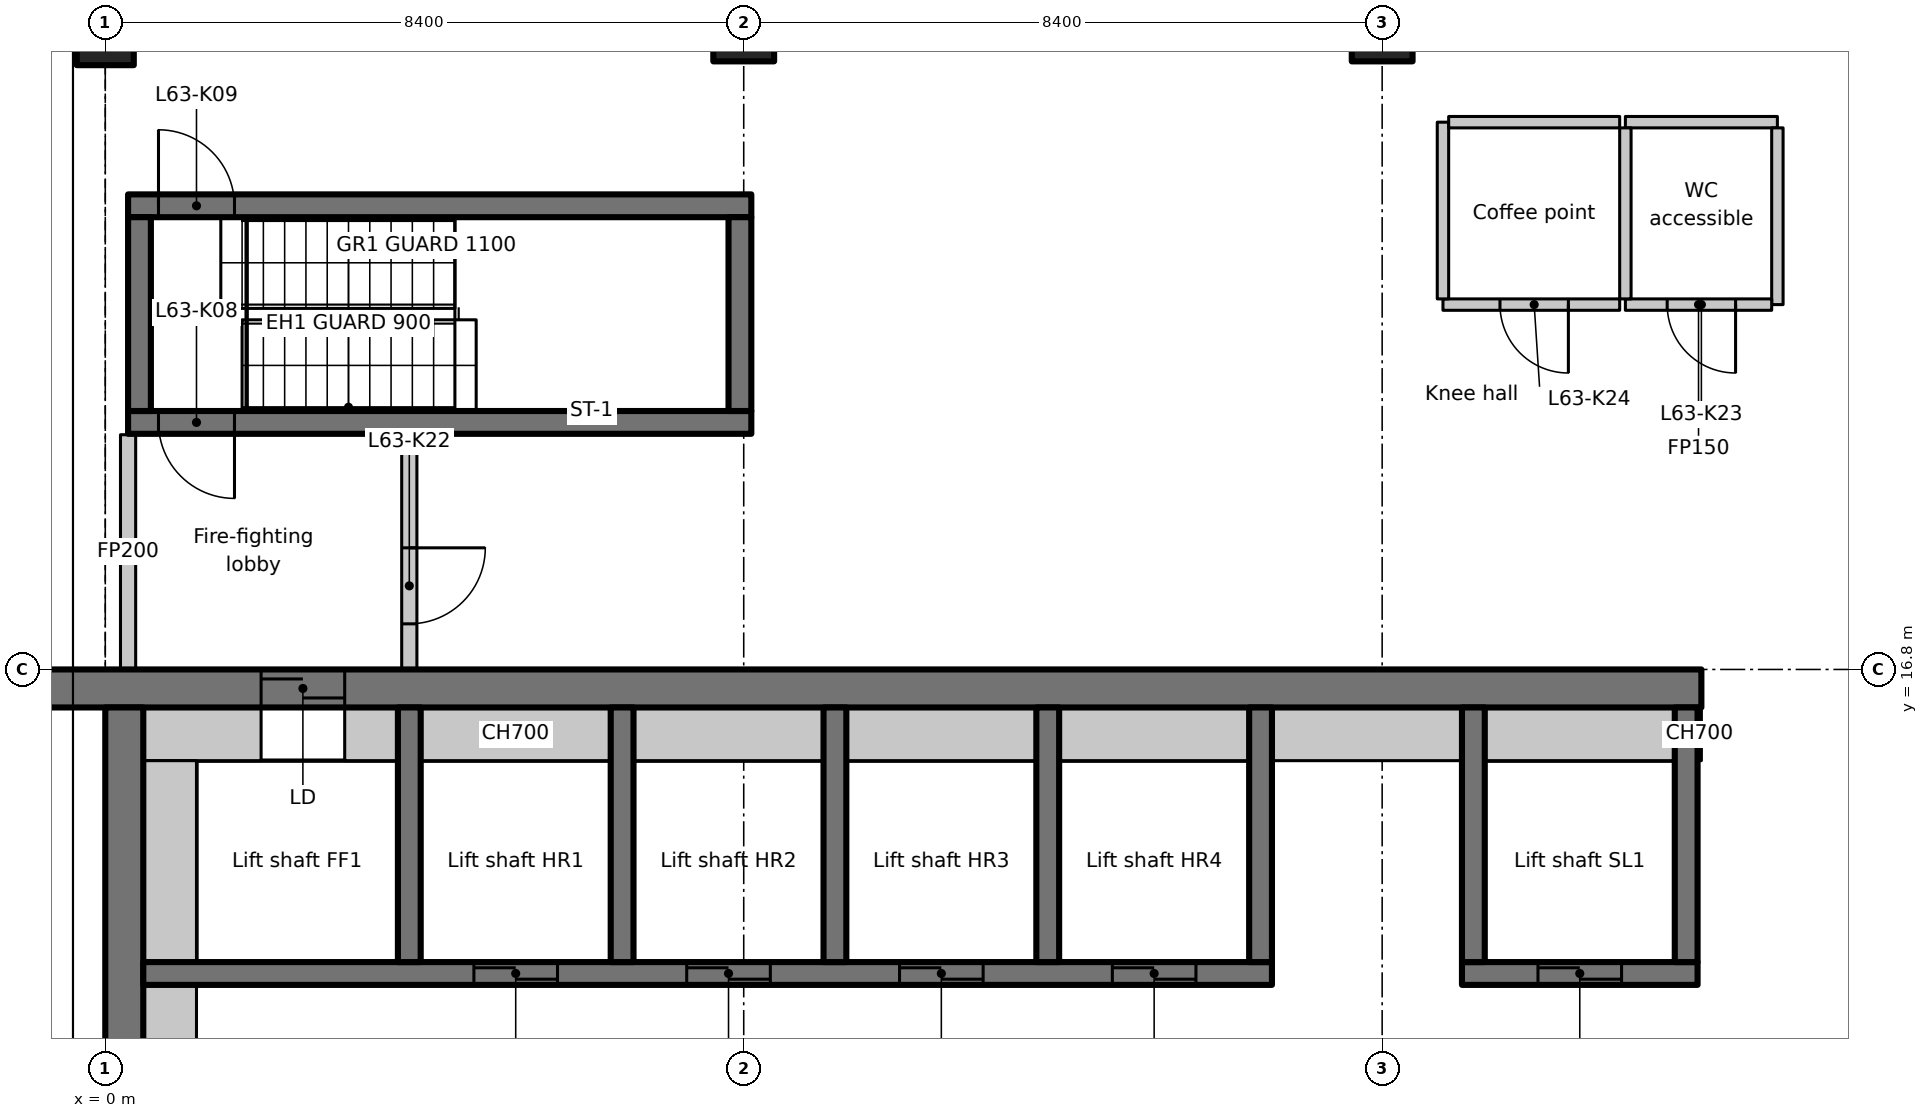
"""IFC4 building model, lengths in metres.
Left out: names, types, materials, properties, quantities, classifications, styles, units other than length and angle.
Written with IfcOpenShell. Run it as: python <this file> out.ifc"""

import sys

from ifc_helpers import new_model, si_unit, direction, frame, frame_2d, origin, origin_2d, place, context, subcontext, project, spatial, rectangle, extrude, element, fill, save


model = new_model("IFC4")
c1 = context("Model", 3, precision=1e-05, world=origin(), true_north=direction((0.0, 1.0)))
c2 = subcontext(c1, "Body", "Model", "MODEL_VIEW")
j1 = project(units=[si_unit("LENGTHUNIT", "METRE"), si_unit("PLANEANGLEUNIT", "RADIAN")], contexts=[c1])
p1 = place(None, origin())
s1 = spatial("IfcSite", under=j1, at=p1, CompositionType="ELEMENT")
p2 = place(p1, origin())
s2 = spatial("IfcBuilding", under=s1, at=p2, CompositionType="ELEMENT")
p3 = place(p2, frame((0.0, 0.0, 248.1)))
s3 = spatial("IfcBuildingStorey", under=s2, at=p3, CompositionType="ELEMENT", Elevation=248.1)
p4 = place(p3, frame((0.0, 25.2, 0.0), z_axis=(0.0, 0.0, 1.0), x_axis=(1.0, 0.0, 0.0)))
e1 = element("IfcColumn", 1, at=p4, inside=s3, PredefinedType="COLUMN", context=c2, shape_type="SweptSolid", body=[
    extrude(rectangle(XDim=0.75, YDim=0.9, at=origin_2d()), origin(), (0.0, 0.0, 1.0), 3.35),
])
for number, where, z_axis, x_axis in (
    (2, (8.4, 25.2, 0.0), (0.0, 0.0, 1.0), (1.0, 0.0, 0.0)),
    (3, (16.8, 25.2, 0.0), (0.0, 0.0, 1.0), (1.0, 0.0, 0.0)),
):
    element("IfcColumn", number, at=place(p3, frame(where, z_axis=z_axis, x_axis=x_axis)), inside=s3, PredefinedType="COLUMN", context=c2, shape_type="SweptSolid", body=[
        extrude(rectangle(XDim=0.8, YDim=0.8, at=origin_2d()), origin(), (0.0, 0.0, 1.0), 3.35),
    ])
p5 = place(p3, frame((-1.1, 16.55, 0.0), z_axis=(0.0, 0.0, 1.0), x_axis=(1.0, 0.0, 0.0)))
e4 = element("IfcWall", 4, at=p5, inside=s3, PredefinedType="SHEAR", context=c2, shape_type="SweptSolid", body=[
    extrude(rectangle(XDim=22.1, YDim=0.5, at=frame_2d((11.05, 0.0))), origin(), (0.0, 0.0, 1.0), 3.35),
])
p6 = place(p5, frame((3.15, 0.0, 0.0)))
e5 = element("IfcOpeningElement", 5, at=p6, cuts=e4, PredefinedType="OPENING", context=c2, shape_type="SweptSolid", body=[
    extrude(rectangle(XDim=1.1, YDim=2.3, at=frame_2d((0.55, 1.15))), frame((0.0, 0.26, 0.0), z_axis=(0.0, -1.0, 0.0), x_axis=(1.0, 0.0, 0.0)), (0.0, 0.0, 1.0), 0.52),
])
p7 = place(p3, frame((0.25, 7.436, 0.0), z_axis=(0.0, 0.0, 1.0), x_axis=(0.0, 1.0, 0.0)))
e6 = element("IfcWall", 6, at=p7, inside=s3, PredefinedType="SHEAR", context=c2, shape_type="SweptSolid", body=[
    extrude(rectangle(XDim=8.864, YDim=0.5, at=frame_2d((4.432, 0.0))), origin(), (0.0, 0.0, 1.0), 3.35),
])
p8 = place(p3, frame((0.5, 15.95, 0.0), z_axis=(0.0, 0.0, 1.0), x_axis=(1.0, 0.0, 0.0)))
e7 = element("IfcWall", 7, at=p8, inside=s3, PredefinedType="PARTITIONING", context=c2, shape_type="SweptSolid", body=[
    extrude(rectangle(XDim=1.55, YDim=0.7, at=frame_2d((0.775, 0.0))), origin(), (0.0, 0.0, 1.0), 3.35),
])
p9 = place(p3, frame((0.5, 12.8, 0.0), z_axis=(0.0, 0.0, 1.0), x_axis=(1.0, 0.0, 0.0)))
e8 = element("IfcWall", 8, at=p9, inside=s3, PredefinedType="SHEAR", context=c2, shape_type="SweptSolid", body=[
    extrude(rectangle(XDim=14.85, YDim=0.3, at=frame_2d((7.425, 0.0))), origin(), (0.0, 0.0, 1.0), 3.35),
])
p10 = place(p9, frame((4.35, 0.0, 0.0)))
e9 = element("IfcOpeningElement", 9, at=p10, cuts=e8, PredefinedType="OPENING", context=c2, shape_type="SweptSolid", body=[
    extrude(rectangle(XDim=1.1, YDim=2.3, at=frame_2d((0.55, 1.15))), frame((0.0, 0.16, 0.0), z_axis=(0.0, -1.0, 0.0), x_axis=(1.0, 0.0, 0.0)), (0.0, 0.0, 1.0), 0.32),
])
p11 = place(p9, frame((7.15, 0.0, 0.0)))
e10 = element("IfcOpeningElement", 10, at=p11, cuts=e8, PredefinedType="OPENING", context=c2, shape_type="SweptSolid", body=[
    extrude(rectangle(XDim=1.1, YDim=2.3, at=frame_2d((0.55, 1.15))), frame((0.0, 0.16, 0.0), z_axis=(0.0, -1.0, 0.0), x_axis=(1.0, 0.0, 0.0)), (0.0, 0.0, 1.0), 0.32),
])
p12 = place(p9, frame((9.95, 0.0, 0.0)))
e11 = element("IfcOpeningElement", 11, at=p12, cuts=e8, PredefinedType="OPENING", context=c2, shape_type="SweptSolid", body=[
    extrude(rectangle(XDim=1.1, YDim=2.3, at=frame_2d((0.55, 1.15))), frame((0.0, 0.16, 0.0), z_axis=(0.0, -1.0, 0.0), x_axis=(1.0, 0.0, 0.0)), (0.0, 0.0, 1.0), 0.32),
])
p13 = place(p9, frame((12.75, 0.0, 0.0)))
e12 = element("IfcOpeningElement", 12, at=p13, cuts=e8, PredefinedType="OPENING", context=c2, shape_type="SweptSolid", body=[
    extrude(rectangle(XDim=1.1, YDim=2.3, at=frame_2d((0.55, 1.15))), frame((0.0, 0.16, 0.0), z_axis=(0.0, -1.0, 0.0), x_axis=(1.0, 0.0, 0.0)), (0.0, 0.0, 1.0), 0.32),
])
for number, where, z_axis, x_axis in (
    (13, (4.0, 12.95, 0.0), (0.0, 0.0, 1.0), (0.0, 1.0, 0.0)),
    (14, (6.8, 12.95, 0.0), (0.0, 0.0, 1.0), (0.0, 1.0, 0.0)),
    (15, (9.6, 12.95, 0.0), (0.0, 0.0, 1.0), (0.0, 1.0, 0.0)),
    (16, (12.4, 12.95, 0.0), (0.0, 0.0, 1.0), (0.0, 1.0, 0.0)),
    (17, (15.2, 12.95, 0.0), (0.0, 0.0, 1.0), (0.0, 1.0, 0.0)),
):
    element("IfcWall", number, at=place(p3, frame(where, z_axis=z_axis, x_axis=x_axis)), inside=s3, PredefinedType="SHEAR", context=c2, shape_type="SweptSolid", body=[
        extrude(rectangle(XDim=3.35, YDim=0.3, at=frame_2d((1.675, 0.0))), origin(), (0.0, 0.0, 1.0), 3.35),
    ])
p14 = place(p3, frame((17.85, 12.8, 0.0), z_axis=(0.0, 0.0, 1.0), x_axis=(1.0, 0.0, 0.0)))
e18 = element("IfcWall", 18, at=p14, inside=s3, PredefinedType="SHEAR", context=c2, shape_type="SweptSolid", body=[
    extrude(rectangle(XDim=3.1, YDim=0.3, at=frame_2d((1.55, 0.0))), origin(), (0.0, 0.0, 1.0), 3.35),
])
p15 = place(p14, frame((1.0, 0.0, 0.0)))
e19 = element("IfcOpeningElement", 19, at=p15, cuts=e18, PredefinedType="OPENING", context=c2, shape_type="SweptSolid", body=[
    extrude(rectangle(XDim=1.1, YDim=2.3, at=frame_2d((0.55, 1.15))), frame((0.0, 0.16, 0.0), z_axis=(0.0, -1.0, 0.0), x_axis=(1.0, 0.0, 0.0)), (0.0, 0.0, 1.0), 0.32),
])
for number, where, z_axis, x_axis in (
    (20, (18.0, 12.95, 0.0), (0.0, 0.0, 1.0), (0.0, 1.0, 0.0)),
    (21, (20.8, 12.95, 0.0), (0.0, 0.0, 1.0), (0.0, 1.0, 0.0)),
):
    element("IfcWall", number, at=place(p3, frame(where, z_axis=z_axis, x_axis=x_axis)), inside=s3, PredefinedType="SHEAR", context=c2, shape_type="SweptSolid", body=[
        extrude(rectangle(XDim=3.35, YDim=0.3, at=frame_2d((1.675, 0.0))), origin(), (0.0, 0.0, 1.0), 3.35),
    ])
p16 = place(p3, frame((8.5, 20.05, 0.0), z_axis=(0.0, 0.0, 1.0), x_axis=(-1.0, 0.0, 0.0)))
e22 = element("IfcWall", 22, at=p16, inside=s3, PredefinedType="SHEAR", context=c2, shape_type="SweptSolid", body=[
    extrude(rectangle(XDim=8.2, YDim=0.3, at=frame_2d((4.1, 0.0))), origin(), (0.0, 0.0, 1.0), 3.35),
])
p17 = place(p16, frame((6.8, 0.0, 0.0)))
e23 = element("IfcOpeningElement", 23, at=p17, cuts=e22, PredefinedType="OPENING", context=c2, shape_type="SweptSolid", body=[
    extrude(rectangle(XDim=1.0, YDim=2.1, at=frame_2d((0.5, 1.05))), frame((0.0, 0.16, 0.0), z_axis=(0.0, -1.0, 0.0), x_axis=(1.0, 0.0, 0.0)), (0.0, 0.0, 1.0), 0.32),
])
p18 = place(p3, frame((0.3, 22.9, 0.0), z_axis=(0.0, 0.0, 1.0), x_axis=(1.0, 0.0, 0.0)))
e24 = element("IfcWall", 24, at=p18, inside=s3, PredefinedType="SHEAR", context=c2, shape_type="SweptSolid", body=[
    extrude(rectangle(XDim=8.2, YDim=0.3, at=frame_2d((4.1, 0.0))), origin(), (0.0, 0.0, 1.0), 3.35),
])
p19 = place(p18, frame((0.4, 0.0, 0.0)))
e25 = element("IfcOpeningElement", 25, at=p19, cuts=e24, PredefinedType="OPENING", context=c2, shape_type="SweptSolid", body=[
    extrude(rectangle(XDim=1.0, YDim=2.1, at=frame_2d((0.5, 1.05))), frame((0.0, 0.16, 0.0), z_axis=(0.0, -1.0, 0.0), x_axis=(1.0, 0.0, 0.0)), (0.0, 0.0, 1.0), 0.32),
])
for number, where, z_axis, x_axis in (
    (26, (0.45, 20.2, 0.0), (0.0, 0.0, 1.0), (0.0, 1.0, 0.0)),
    (27, (8.35, 20.2, 0.0), (0.0, 0.0, 1.0), (0.0, 1.0, 0.0)),
):
    element("IfcWall", number, at=place(p3, frame(where, z_axis=z_axis, x_axis=x_axis)), inside=s3, PredefinedType="SHEAR", context=c2, shape_type="SweptSolid", body=[
        extrude(rectangle(XDim=2.55, YDim=0.3, at=frame_2d((1.275, 0.0))), origin(), (0.0, 0.0, 1.0), 3.35),
    ])
p20 = place(p3, frame((0.3, 16.812, 0.0), z_axis=(0.0, 0.0, 1.0), x_axis=(0.0, 1.0, 0.0)))
e28 = element("IfcWall", 28, at=p20, inside=s3, PredefinedType="PARTITIONING", context=c2, shape_type="SweptSolid", body=[
    extrude(rectangle(XDim=3.076, YDim=0.2, at=frame_2d((1.538, 0.0))), origin(), (0.0, 0.0, 1.0), 2.98),
])
p21 = place(p3, frame((4.0, 19.888, 0.0), z_axis=(0.0, 0.0, 1.0), x_axis=(0.0, -1.0, 0.0)))
e29 = element("IfcWall", 29, at=p21, inside=s3, PredefinedType="PARTITIONING", context=c2, shape_type="SweptSolid", body=[
    extrude(rectangle(XDim=3.076, YDim=0.2, at=frame_2d((1.538, 0.0))), origin(), (0.0, 0.0, 1.0), 3.35),
])
p22 = place(p21, frame((1.488, 0.0, 0.0)))
e30 = element("IfcOpeningElement", 30, at=p22, cuts=e29, PredefinedType="OPENING", context=c2, shape_type="SweptSolid", body=[
    extrude(rectangle(XDim=1.0, YDim=2.1, at=frame_2d((0.5, 1.05))), frame((0.0, 0.11, 0.0), z_axis=(0.0, -1.0, 0.0), x_axis=(1.0, 0.0, 0.0)), (0.0, 0.0, 1.0), 0.22),
])
p23 = place(p3, frame((20.0, 24.0, 0.0), z_axis=(0.0, 0.0, 1.0), x_axis=(1.0, 0.0, 0.0)))
e31 = element("IfcWall", 31, at=p23, inside=s3, PredefinedType="PARTITIONING", context=c2, shape_type="SweptSolid", body=[
    extrude(rectangle(XDim=2.0, YDim=0.15, at=frame_2d((1.0, 0.0))), origin(), (0.0, 0.0, 1.0), 3.35),
])
p24 = place(p3, frame((22.0, 23.925, 0.0), z_axis=(0.0, 0.0, 1.0), x_axis=(0.0, -1.0, 0.0)))
e32 = element("IfcWall", 32, at=p24, inside=s3, PredefinedType="PARTITIONING", context=c2, shape_type="SweptSolid", body=[
    extrude(rectangle(XDim=2.325, YDim=0.15, at=frame_2d((1.163, 0.0))), origin(), (0.0, 0.0, 1.0), 3.35),
])
p25 = place(p3, frame((21.925, 21.6, 0.0), z_axis=(0.0, 0.0, 1.0), x_axis=(-1.0, 0.0, 0.0)))
e33 = element("IfcWall", 33, at=p25, inside=s3, PredefinedType="PARTITIONING", context=c2, shape_type="SweptSolid", body=[
    extrude(rectangle(XDim=1.925, YDim=0.15, at=frame_2d((0.962, 0.0))), origin(), (0.0, 0.0, 1.0), 3.35),
])
p26 = place(p25, frame((0.475, 0.0, 0.0)))
e34 = element("IfcOpeningElement", 34, at=p26, cuts=e33, PredefinedType="OPENING", context=c2, shape_type="SweptSolid", body=[
    extrude(rectangle(XDim=0.9, YDim=2.1, at=frame_2d((0.45, 1.05))), frame((0.0, 0.085, 0.0), z_axis=(0.0, -1.0, 0.0), x_axis=(1.0, 0.0, 0.0)), (0.0, 0.0, 1.0), 0.17),
])
p27 = place(p3, frame((20.0, 21.675, 0.0), z_axis=(0.0, 0.0, 1.0), x_axis=(0.0, 1.0, 0.0)))
e35 = element("IfcWall", 35, at=p27, inside=s3, PredefinedType="PARTITIONING", context=c2, shape_type="SweptSolid", body=[
    extrude(rectangle(XDim=2.25, YDim=0.15, at=frame_2d((1.125, 0.0))), origin(), (0.0, 0.0, 1.0), 3.35),
])
p28 = place(p3, frame((19.925, 21.6, 0.0), z_axis=(0.0, 0.0, 1.0), x_axis=(-1.0, 0.0, 0.0)))
e36 = element("IfcWall", 36, at=p28, inside=s3, PredefinedType="PARTITIONING", context=c2, shape_type="SweptSolid", body=[
    extrude(rectangle(XDim=2.325, YDim=0.15, at=frame_2d((1.163, 0.0))), origin(), (0.0, 0.0, 1.0), 3.35),
])
p29 = place(p28, frame((0.675, 0.0, 0.0)))
e37 = element("IfcOpeningElement", 37, at=p29, cuts=e36, PredefinedType="OPENING", context=c2, shape_type="SweptSolid", body=[
    extrude(rectangle(XDim=0.9, YDim=2.1, at=frame_2d((0.45, 1.05))), frame((0.0, 0.085, 0.0), z_axis=(0.0, -1.0, 0.0), x_axis=(1.0, 0.0, 0.0)), (0.0, 0.0, 1.0), 0.17),
])
p30 = place(p3, frame((17.6, 21.675, 0.0), z_axis=(0.0, 0.0, 1.0), x_axis=(0.0, 1.0, 0.0)))
e38 = element("IfcWall", 38, at=p30, inside=s3, PredefinedType="PARTITIONING", context=c2, shape_type="SweptSolid", body=[
    extrude(rectangle(XDim=2.325, YDim=0.15, at=frame_2d((1.163, 0.0))), origin(), (0.0, 0.0, 1.0), 3.35),
])
p31 = place(p3, frame((17.675, 24.0, 0.0), z_axis=(0.0, 0.0, 1.0), x_axis=(1.0, 0.0, 0.0)))
e39 = element("IfcWall", 39, at=p31, inside=s3, PredefinedType="PARTITIONING", context=c2, shape_type="SweptSolid", body=[
    extrude(rectangle(XDim=2.25, YDim=0.15, at=frame_2d((1.125, 0.0))), origin(), (0.0, 0.0, 1.0), 3.35),
])
p32 = place(p3, frame((0.85, 7.436, 0.0), z_axis=(0.0, 0.0, 1.0), x_axis=(0.0, 1.0, 0.0)))
e40 = element("IfcWall", 40, at=p32, inside=s3, PredefinedType="PARTITIONING", context=c2, shape_type="SweptSolid", body=[
    extrude(rectangle(XDim=5.214, YDim=0.7, at=frame_2d((2.607, 0.0))), origin(), (0.0, 0.0, 1.0), 3.35),
])
p33 = place(p3, frame((0.85, 12.95, 0.0), z_axis=(0.0, 0.0, 1.0), x_axis=(0.0, 1.0, 0.0)))
e41 = element("IfcWall", 41, at=p33, inside=s3, PredefinedType="PARTITIONING", context=c2, shape_type="SweptSolid", body=[
    extrude(rectangle(XDim=2.65, YDim=0.7, at=frame_2d((1.325, 0.0))), origin(), (0.0, 0.0, 1.0), 3.35),
])
p34 = place(p3, frame((3.15, 15.95, 0.0), z_axis=(0.0, 0.0, 1.0), x_axis=(1.0, 0.0, 0.0)))
e42 = element("IfcWall", 42, at=p34, inside=s3, PredefinedType="PARTITIONING", context=c2, shape_type="SweptSolid", body=[
    extrude(rectangle(XDim=0.7, YDim=0.7, at=frame_2d((0.35, 0.0))), origin(), (0.0, 0.0, 1.0), 3.35),
])
for number, where, z_axis, x_axis in (
    (43, (4.15, 15.95, 0.0), (0.0, 0.0, 1.0), (1.0, 0.0, 0.0)),
    (44, (6.95, 15.95, 0.0), (0.0, 0.0, 1.0), (1.0, 0.0, 0.0)),
    (45, (9.75, 15.95, 0.0), (0.0, 0.0, 1.0), (1.0, 0.0, 0.0)),
    (46, (12.55, 15.95, 0.0), (0.0, 0.0, 1.0), (1.0, 0.0, 0.0)),
    (47, (15.35, 15.95, 0.0), (0.0, 0.0, 1.0), (1.0, 0.0, 0.0)),
    (48, (18.15, 15.95, 0.0), (0.0, 0.0, 1.0), (1.0, 0.0, 0.0)),
):
    element("IfcWall", number, at=place(p3, frame(where, z_axis=z_axis, x_axis=x_axis)), inside=s3, PredefinedType="PARTITIONING", context=c2, shape_type="SweptSolid", body=[
        extrude(rectangle(XDim=2.5, YDim=0.7, at=frame_2d((1.25, 0.0))), origin(), (0.0, 0.0, 1.0), 3.35),
    ])
p35 = place(p3, frame((20.95, 15.95, 0.0), z_axis=(0.0, 0.0, 1.0), x_axis=(1.0, 0.0, 0.0)))
e49 = element("IfcWall", 49, at=p35, inside=s3, PredefinedType="PARTITIONING", context=c2, shape_type="SweptSolid", body=[
    extrude(rectangle(XDim=0.05, YDim=0.7, at=frame_2d((0.025, 0.0))), origin(), (0.0, 0.0, 1.0), 3.35),
])
p36 = place(p6, origin())
e50 = element("IfcDoor", 50, at=p36, inside=s3, OperationType="SLIDING_TO_LEFT", PredefinedType="DOOR", context=c2, shape_type="SweptSolid", body=[
    extrude(rectangle(XDim=1.1, YDim=2.3, at=frame_2d((0.55, 1.15))), frame((0.0, 0.025, 0.0), z_axis=(0.0, -1.0, 0.0), x_axis=(1.0, 0.0, 0.0)), (0.0, 0.0, 1.0), 0.05),
])
fill(e5, e50)
p37 = place(p10, origin())
e51 = element("IfcDoor", 51, at=p37, inside=s3, OperationType="SLIDING_TO_LEFT", PredefinedType="DOOR", context=c2, shape_type="SweptSolid", body=[
    extrude(rectangle(XDim=1.1, YDim=2.3, at=frame_2d((0.55, 1.15))), frame((0.0, 0.025, 0.0), z_axis=(0.0, -1.0, 0.0), x_axis=(1.0, 0.0, 0.0)), (0.0, 0.0, 1.0), 0.05),
])
fill(e9, e51)
p38 = place(p11, origin())
e52 = element("IfcDoor", 52, at=p38, inside=s3, OperationType="SLIDING_TO_LEFT", PredefinedType="DOOR", context=c2, shape_type="SweptSolid", body=[
    extrude(rectangle(XDim=1.1, YDim=2.3, at=frame_2d((0.55, 1.15))), frame((0.0, 0.025, 0.0), z_axis=(0.0, -1.0, 0.0), x_axis=(1.0, 0.0, 0.0)), (0.0, 0.0, 1.0), 0.05),
])
fill(e10, e52)
p39 = place(p12, origin())
e53 = element("IfcDoor", 53, at=p39, inside=s3, OperationType="SLIDING_TO_LEFT", PredefinedType="DOOR", context=c2, shape_type="SweptSolid", body=[
    extrude(rectangle(XDim=1.1, YDim=2.3, at=frame_2d((0.55, 1.15))), frame((0.0, 0.025, 0.0), z_axis=(0.0, -1.0, 0.0), x_axis=(1.0, 0.0, 0.0)), (0.0, 0.0, 1.0), 0.05),
])
fill(e11, e53)
p40 = place(p13, origin())
e54 = element("IfcDoor", 54, at=p40, inside=s3, OperationType="SLIDING_TO_LEFT", PredefinedType="DOOR", context=c2, shape_type="SweptSolid", body=[
    extrude(rectangle(XDim=1.1, YDim=2.3, at=frame_2d((0.55, 1.15))), frame((0.0, 0.025, 0.0), z_axis=(0.0, -1.0, 0.0), x_axis=(1.0, 0.0, 0.0)), (0.0, 0.0, 1.0), 0.05),
])
fill(e12, e54)
p41 = place(p15, origin())
e55 = element("IfcDoor", 55, at=p41, inside=s3, OperationType="SLIDING_TO_LEFT", PredefinedType="DOOR", context=c2, shape_type="SweptSolid", body=[
    extrude(rectangle(XDim=1.1, YDim=2.3, at=frame_2d((0.55, 1.15))), frame((0.0, 0.025, 0.0), z_axis=(0.0, -1.0, 0.0), x_axis=(1.0, 0.0, 0.0)), (0.0, 0.0, 1.0), 0.05),
])
fill(e19, e55)
p42 = place(p17, origin())
e56 = element("IfcDoor", 56, at=p42, inside=s3, OperationType="SINGLE_SWING_LEFT", PredefinedType="DOOR", context=c2, shape_type="SweptSolid", body=[
    extrude(rectangle(XDim=1.0, YDim=2.1, at=frame_2d((0.5, 1.05))), frame((0.0, 0.025, 0.0), z_axis=(0.0, -1.0, 0.0), x_axis=(1.0, 0.0, 0.0)), (0.0, 0.0, 1.0), 0.05),
])
fill(e23, e56)
p43 = place(p19, origin())
e57 = element("IfcDoor", 57, at=p43, inside=s3, OperationType="SINGLE_SWING_RIGHT", PredefinedType="DOOR", context=c2, shape_type="SweptSolid", body=[
    extrude(rectangle(XDim=1.0, YDim=2.1, at=frame_2d((0.5, 1.05))), frame((0.0, 0.025, 0.0), z_axis=(0.0, -1.0, 0.0), x_axis=(1.0, 0.0, 0.0)), (0.0, 0.0, 1.0), 0.05),
])
fill(e25, e57)
p44 = place(p22, origin())
e58 = element("IfcDoor", 58, at=p44, inside=s3, OperationType="SINGLE_SWING_LEFT", PredefinedType="DOOR", context=c2, shape_type="SweptSolid", body=[
    extrude(rectangle(XDim=1.0, YDim=2.1, at=frame_2d((0.5, 1.05))), frame((0.0, 0.025, 0.0), z_axis=(0.0, -1.0, 0.0), x_axis=(1.0, 0.0, 0.0)), (0.0, 0.0, 1.0), 0.05),
])
fill(e30, e58)
p45 = place(p26, origin())
e59 = element("IfcDoor", 59, at=p45, inside=s3, OperationType="SINGLE_SWING_RIGHT", PredefinedType="DOOR", context=c2, shape_type="SweptSolid", body=[
    extrude(rectangle(XDim=0.9, YDim=2.1, at=frame_2d((0.45, 1.05))), frame((0.0, 0.025, 0.0), z_axis=(0.0, -1.0, 0.0), x_axis=(1.0, 0.0, 0.0)), (0.0, 0.0, 1.0), 0.05),
])
fill(e34, e59)
p46 = place(p29, origin())
e60 = element("IfcDoor", 60, at=p46, inside=s3, OperationType="SINGLE_SWING_LEFT", PredefinedType="DOOR", context=c2, shape_type="SweptSolid", body=[
    extrude(rectangle(XDim=0.9, YDim=2.1, at=frame_2d((0.45, 1.05))), frame((0.0, 0.025, 0.0), z_axis=(0.0, -1.0, 0.0), x_axis=(1.0, 0.0, 0.0)), (0.0, 0.0, 1.0), 0.05),
])
fill(e37, e60)
save(model, sys.argv[1])
